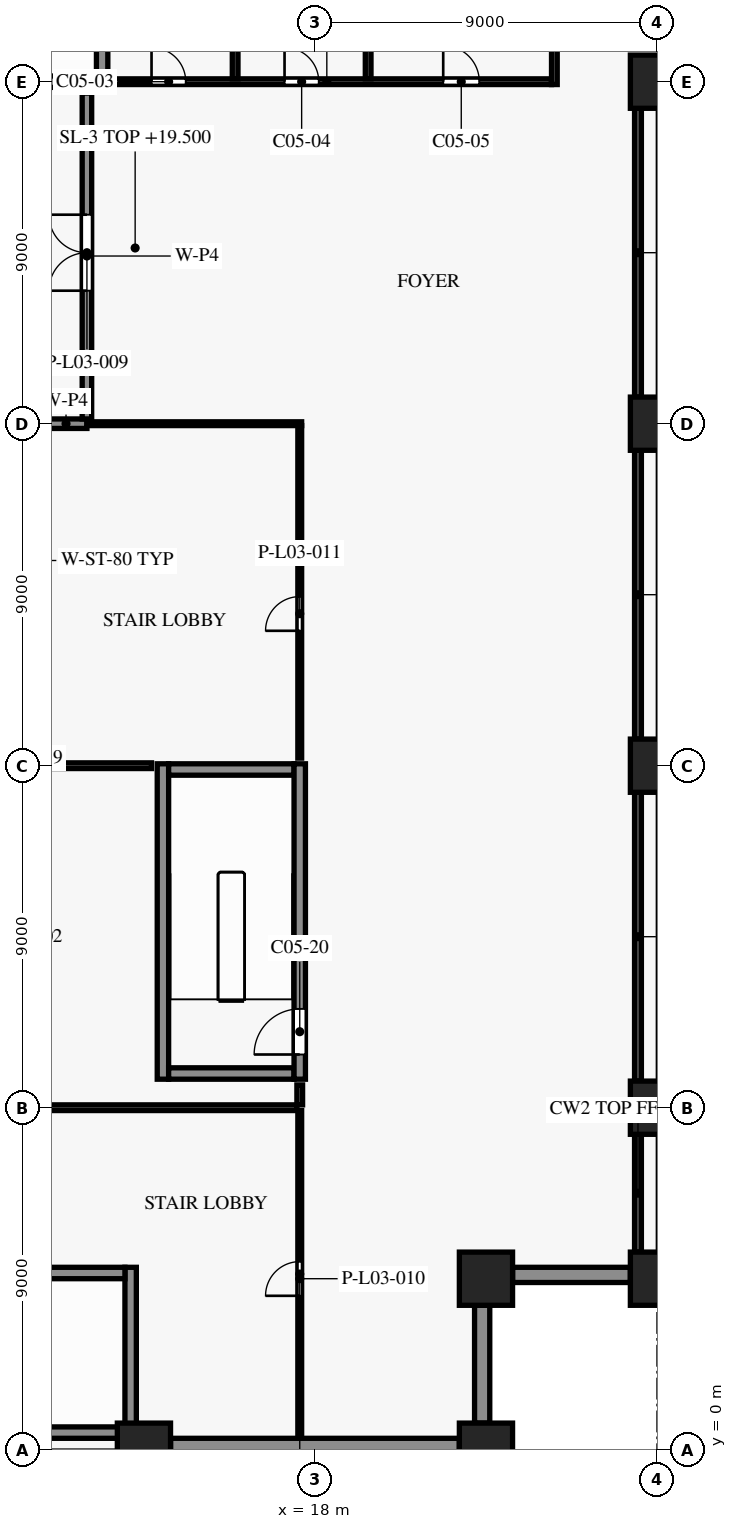
"""IFC4 building model, lengths in metres.
Left out: names, types, materials, properties, quantities, classifications, styles, units other than length and angle.
Written with IfcOpenShell. Run it as: python <this file> out.ifc"""

import sys

from ifc_helpers import new_model, si_unit, direction, frame, frame_2d, origin, origin_2d, place, context, subcontext, project, spatial, rectangle, extrude, element, fill, save


model = new_model("IFC4")
c1 = context("Model", 3, precision=1e-05, world=origin(), true_north=direction((0.0, 1.0)))
c2 = subcontext(c1, "Body", "Model", "MODEL_VIEW")
j1 = project(units=[si_unit("LENGTHUNIT", "METRE"), si_unit("PLANEANGLEUNIT", "RADIAN")], contexts=[c1])
p1 = place(None, origin())
s1 = spatial("IfcSite", under=j1, at=p1, CompositionType="ELEMENT")
p2 = place(p1, origin())
s2 = spatial("IfcBuilding", under=s1, at=p2, CompositionType="ELEMENT")
p3 = place(p2, frame((0.0, 0.0, 19.5)))
s3 = spatial("IfcBuildingStorey", under=s2, at=p3, CompositionType="ELEMENT", Elevation=19.5)
for number, where, z_axis, x_axis in (
    (1, (13.5, 0.0, 0.0), (0.0, 0.0, 1.0), (1.0, 0.0, 0.0)),
    (2, (22.5, 0.0, 0.0), (0.0, 0.0, 1.0), (1.0, 0.0, 0.0)),
    (3, (27.0, 4.5, 0.0), (0.0, 0.0, 1.0), (1.0, 0.0, 0.0)),
    (4, (27.0, 9.0, 0.0), (0.0, 0.0, 1.0), (1.0, 0.0, 0.0)),
    (5, (27.0, 18.0, 0.0), (0.0, 0.0, 1.0), (1.0, 0.0, 0.0)),
    (6, (27.0, 27.0, 0.0), (0.0, 0.0, 1.0), (1.0, 0.0, 0.0)),
    (7, (27.0, 36.0, 0.0), (0.0, 0.0, 1.0), (1.0, 0.0, 0.0)),
    (8, (22.5, 4.5, 0.0), (0.0, 0.0, 1.0), (1.0, 0.0, 0.0)),
):
    element("IfcColumn", number, at=place(p3, frame(where, z_axis=z_axis, x_axis=x_axis)), inside=s3, PredefinedType="COLUMN", context=c2, shape_type="SweptSolid", body=[
        extrude(rectangle(XDim=1.4, YDim=1.4, at=origin_2d()), origin(), (0.0, 0.0, 1.0), 8.0),
    ])
p4 = place(p3, frame((21.8, 0.1, 0.0), z_axis=(0.0, 0.0, 1.0), x_axis=(-1.0, 0.0, 0.0)))
e9 = element("IfcWall", 9, at=p4, inside=s3, PredefinedType="SOLIDWALL", context=c2, shape_type="SweptSolid", body=[
    extrude(rectangle(XDim=7.6, YDim=0.4, at=frame_2d((3.8, 0.0))), origin(), (0.0, 0.0, 1.0), 7.1),
])
for number, where, z_axis, x_axis in (
    (10, (22.4, 3.8, 0.0), (0.0, 0.0, 1.0), (0.0, -1.0, 0.0)),
    (11, (26.3, 4.6, 0.0), (0.0, 0.0, 1.0), (-1.0, 0.0, 0.0)),
):
    element("IfcWall", number, at=place(p3, frame(where, z_axis=z_axis, x_axis=x_axis)), inside=s3, PredefinedType="SOLIDWALL", context=c2, shape_type="SweptSolid", body=[
        extrude(rectangle(XDim=3.1, YDim=0.4, at=frame_2d((1.55, 0.0))), origin(), (0.0, 0.0, 1.0), 7.1),
    ])
p5 = place(p3, frame((5.0, 0.45, 0.0), z_axis=(0.0, 0.0, 1.0), x_axis=(1.0, 0.0, 0.0)))
e12 = element("IfcWall", 12, at=p5, inside=s3, PredefinedType="SHEAR", context=c2, shape_type="SweptSolid", body=[
    extrude(rectangle(XDim=8.0, YDim=0.3, at=frame_2d((4.0, 0.0))), origin(), (0.0, 0.0, 1.0), 7.7),
])
p6 = place(p3, frame((5.0, 4.65, 0.0), z_axis=(0.0, 0.0, 1.0), x_axis=(1.0, 0.0, 0.0)))
e13 = element("IfcWall", 13, at=p6, inside=s3, PredefinedType="SHEAR", context=c2, shape_type="SweptSolid", body=[
    extrude(rectangle(XDim=8.0, YDim=0.3, at=frame_2d((4.0, 0.0))), origin(), (0.0, 0.0, 1.0), 7.7),
])
p7 = place(p6, frame((0.5, 0.0, 0.0)))
e14 = element("IfcOpeningElement", 14, at=p7, cuts=e13, PredefinedType="OPENING", context=c2, shape_type="SweptSolid", body=[
    extrude(rectangle(XDim=1.2, YDim=2.2, at=frame_2d((0.6, 1.1))), frame((0.0, 0.16, 0.0), z_axis=(0.0, -1.0, 0.0), x_axis=(1.0, 0.0, 0.0)), (0.0, 0.0, 1.0), 0.32),
])
for number, where, z_axis, x_axis in (
    (15, (14.15, 9.9, 0.0), (0.0, 0.0, 1.0), (1.0, 0.0, 0.0)),
    (16, (14.15, 17.9, 0.0), (0.0, 0.0, 1.0), (1.0, 0.0, 0.0)),
):
    element("IfcWall", number, at=place(p3, frame(where, z_axis=z_axis, x_axis=x_axis)), inside=s3, PredefinedType="SHEAR", context=c2, shape_type="SweptSolid", body=[
        extrude(rectangle(XDim=3.3, YDim=0.3, at=frame_2d((1.65, 0.0))), origin(), (0.0, 0.0, 1.0), 7.7),
    ])
p8 = place(p3, frame((12.4, 36.0, 0.0), z_axis=(0.0, 0.0, 1.0), x_axis=(1.0, 0.0, 0.0)))
e17 = element("IfcWall", 17, at=p8, inside=s3, PredefinedType="SHEAR", context=c2, shape_type="SweptSolid", body=[
    extrude(rectangle(XDim=11.825, YDim=0.15, at=frame_2d((5.913, 0.0))), origin(), (0.0, 0.0, 1.0), 7.7),
])
p9 = place(p8, frame((1.3, 0.0, 0.0)))
e18 = element("IfcOpeningElement", 18, at=p9, cuts=e17, PredefinedType="OPENING", context=c2, shape_type="SweptSolid", body=[
    extrude(rectangle(XDim=0.9, YDim=2.1, at=frame_2d((0.45, 1.05))), frame((0.0, 0.085, 0.0), z_axis=(0.0, -1.0, 0.0), x_axis=(1.0, 0.0, 0.0)), (0.0, 0.0, 1.0), 0.17),
])
p10 = place(p8, frame((4.8, 0.0, 0.0)))
e19 = element("IfcOpeningElement", 19, at=p10, cuts=e17, PredefinedType="OPENING", context=c2, shape_type="SweptSolid", body=[
    extrude(rectangle(XDim=0.9, YDim=2.1, at=frame_2d((0.45, 1.05))), frame((0.0, 0.085, 0.0), z_axis=(0.0, -1.0, 0.0), x_axis=(1.0, 0.0, 0.0)), (0.0, 0.0, 1.0), 0.17),
])
p11 = place(p8, frame((8.975, 0.0, 0.0)))
e20 = element("IfcOpeningElement", 20, at=p11, cuts=e17, PredefinedType="OPENING", context=c2, shape_type="SweptSolid", body=[
    extrude(rectangle(XDim=0.95, YDim=2.1, at=frame_2d((0.475, 1.05))), frame((0.0, 0.085, 0.0), z_axis=(0.0, -1.0, 0.0), x_axis=(1.0, 0.0, 0.0)), (0.0, 0.0, 1.0), 0.17),
])
p12 = place(p3, frame((4.4, 36.0, 0.0), z_axis=(0.0, 0.0, 1.0), x_axis=(1.0, 0.0, 0.0)))
e21 = element("IfcWall", 21, at=p12, inside=s3, PredefinedType="SHEAR", context=c2, shape_type="SweptSolid", body=[
    extrude(rectangle(XDim=8.0, YDim=0.3, at=frame_2d((4.0, 0.0))), origin(), (0.0, 0.0, 1.0), 7.7),
])
p13 = place(p12, frame((0.3, 0.0, 0.0)))
e22 = element("IfcOpeningElement", 22, at=p13, cuts=e21, PredefinedType="OPENING", context=c2, shape_type="SweptSolid", body=[
    extrude(rectangle(XDim=1.5, YDim=2.2, at=frame_2d((0.75, 1.1))), frame((0.0, 0.16, 0.0), z_axis=(0.0, -1.0, 0.0), x_axis=(1.0, 0.0, 0.0)), (0.0, 0.0, 1.0), 0.32),
])
p14 = place(p3, frame((12.4, 36.15, 0.0), z_axis=(0.0, 0.0, 1.0), x_axis=(0.0, 1.0, 0.0)))
e23 = element("IfcWall", 23, at=p14, inside=s3, PredefinedType="SHEAR", context=c2, shape_type="SweptSolid", body=[
    extrude(rectangle(XDim=3.725, YDim=0.3, at=frame_2d((1.863, 0.0))), origin(), (0.0, 0.0, 1.0), 7.7),
])
p15 = place(p3, frame((13.15, 0.3, 0.0), z_axis=(0.0, 0.0, 1.0), x_axis=(0.0, 1.0, 0.0)))
e24 = element("IfcWall", 24, at=p15, inside=s3, PredefinedType="SHEAR", context=c2, shape_type="SweptSolid", body=[
    extrude(rectangle(XDim=4.5, YDim=0.3, at=frame_2d((2.25, 0.0))), origin(), (0.0, 0.0, 1.0), 7.7),
])
p16 = place(p3, frame((14.0, 9.75, 0.0), z_axis=(0.0, 0.0, 1.0), x_axis=(0.0, 1.0, 0.0)))
e25 = element("IfcWall", 25, at=p16, inside=s3, PredefinedType="SHEAR", context=c2, shape_type="SweptSolid", body=[
    extrude(rectangle(XDim=8.3, YDim=0.3, at=frame_2d((4.15, 0.0))), origin(), (0.0, 0.0, 1.0), 7.7),
])
p17 = place(p3, frame((15.9, 36.075, 0.0), z_axis=(0.0, 0.0, 1.0), x_axis=(0.0, 1.0, 0.0)))
e26 = element("IfcWall", 26, at=p17, inside=s3, PredefinedType="PARTITIONING", context=c2, shape_type="SweptSolid", body=[
    extrude(rectangle(XDim=3.8, YDim=0.15, at=frame_2d((1.9, 0.0))), origin(), (0.0, 0.0, 1.0), 7.7),
])
p18 = place(p3, frame((17.6, 9.75, 0.0), z_axis=(0.0, 0.0, 1.0), x_axis=(0.0, 1.0, 0.0)))
e27 = element("IfcWall", 27, at=p18, inside=s3, PredefinedType="SHEAR", context=c2, shape_type="SweptSolid", body=[
    extrude(rectangle(XDim=8.3, YDim=0.3, at=frame_2d((4.15, 0.0))), origin(), (0.0, 0.0, 1.0), 7.7),
])
p19 = place(p18, frame((0.65, 0.0, 0.0)))
e28 = element("IfcOpeningElement", 28, at=p19, cuts=e27, PredefinedType="OPENING", context=c2, shape_type="SweptSolid", body=[
    extrude(rectangle(XDim=1.2, YDim=2.2, at=frame_2d((0.6, 1.1))), frame((0.0, 0.16, 0.0), z_axis=(0.0, -1.0, 0.0), x_axis=(1.0, 0.0, 0.0)), (0.0, 0.0, 1.0), 0.32),
])
p20 = place(p3, frame((19.4, 36.075, 0.0), z_axis=(0.0, 0.0, 1.0), x_axis=(0.0, 1.0, 0.0)))
e29 = element("IfcWall", 29, at=p20, inside=s3, PredefinedType="PARTITIONING", context=c2, shape_type="SweptSolid", body=[
    extrude(rectangle(XDim=3.8, YDim=0.15, at=frame_2d((1.9, 0.0))), origin(), (0.0, 0.0, 1.0), 7.7),
])
p21 = place(p3, frame((24.3, 35.925, 0.0), z_axis=(0.0, 0.0, 1.0), x_axis=(0.0, 1.0, 0.0)))
e30 = element("IfcWall", 30, at=p21, inside=s3, PredefinedType="SHEAR", context=c2, shape_type="SweptSolid", body=[
    extrude(rectangle(XDim=4.075, YDim=0.15, at=frame_2d((2.038, 0.0))), origin(), (0.0, 0.0, 1.0), 7.7),
])
p22 = place(p3, frame((17.6, 0.32, 0.0), z_axis=(0.0, 0.0, 1.0), x_axis=(0.0, 1.0, 0.0)))
e31 = element("IfcWall", 31, at=p22, inside=s3, PredefinedType="PARTITIONING", context=c2, shape_type="SweptSolid", body=[
    extrude(rectangle(XDim=8.605, YDim=0.1, at=frame_2d((4.302, 0.0))), origin(), (0.0, 0.0, 1.0), 6.98),
])
p23 = place(p22, frame((3.73, 0.0, 0.0)))
e32 = element("IfcOpeningElement", 32, at=p23, cuts=e31, PredefinedType="OPENING", context=c2, shape_type="SweptSolid", body=[
    extrude(rectangle(XDim=0.9, YDim=2.1, at=frame_2d((0.45, 1.05))), frame((0.0, 0.06, 0.0), z_axis=(0.0, -1.0, 0.0), x_axis=(1.0, 0.0, 0.0)), (0.0, 0.0, 1.0), 0.12),
])
p24 = place(p3, frame((0.72, 9.0, 0.0), z_axis=(0.0, 0.0, 1.0), x_axis=(1.0, 0.0, 0.0)))
e33 = element("IfcWall", 33, at=p24, inside=s3, PredefinedType="PARTITIONING", context=c2, shape_type="SweptSolid", body=[
    extrude(rectangle(XDim=16.805, YDim=0.15, at=frame_2d((8.402, 0.0))), origin(), (0.0, 0.0, 1.0), 6.98),
])
p25 = place(p3, frame((17.6, 9.075, 0.0), z_axis=(0.0, 0.0, 1.0), x_axis=(0.0, 1.0, 0.0)))
e34 = element("IfcWall", 34, at=p25, inside=s3, PredefinedType="PARTITIONING", context=c2, shape_type="SweptSolid", body=[
    extrude(rectangle(XDim=0.525, YDim=0.15, at=frame_2d((0.263, 0.0))), origin(), (0.0, 0.0, 1.0), 6.98),
])
p26 = place(p3, frame((13.7, 18.0, 0.0), z_axis=(0.0, 0.0, 1.0), x_axis=(-1.0, 0.0, 0.0)))
e35 = element("IfcWall", 35, at=p26, inside=s3, PredefinedType="PARTITIONING", context=c2, shape_type="SweptSolid", body=[
    extrude(rectangle(XDim=13.88, YDim=0.15, at=frame_2d((6.94, 0.0))), origin(), (0.0, 0.0, 1.0), 6.98),
])
p27 = place(p26, frame((10.25, 0.0, 0.0)))
e36 = element("IfcOpeningElement", 36, at=p27, cuts=e35, PredefinedType="OPENING", context=c2, shape_type="SweptSolid", body=[
    extrude(rectangle(XDim=0.9, YDim=2.1, at=frame_2d((0.45, 1.05))), frame((0.0, 0.085, 0.0), z_axis=(0.0, -1.0, 0.0), x_axis=(1.0, 0.0, 0.0)), (0.0, 0.0, 1.0), 0.17),
])
p28 = place(p3, frame((17.6, 18.2, 0.0), z_axis=(0.0, 0.0, 1.0), x_axis=(0.0, 1.0, 0.0)))
e37 = element("IfcWall", 37, at=p28, inside=s3, PredefinedType="PARTITIONING", context=c2, shape_type="SweptSolid", body=[
    extrude(rectangle(XDim=8.75, YDim=0.1, at=frame_2d((4.375, 0.0))), origin(), (0.0, 0.0, 1.0), 6.98),
])
p29 = place(p28, frame((3.35, 0.0, 0.0)))
e38 = element("IfcOpeningElement", 38, at=p29, cuts=e37, PredefinedType="OPENING", context=c2, shape_type="SweptSolid", body=[
    extrude(rectangle(XDim=0.9, YDim=2.1, at=frame_2d((0.45, 1.05))), frame((0.0, 0.06, 0.0), z_axis=(0.0, -1.0, 0.0), x_axis=(1.0, 0.0, 0.0)), (0.0, 0.0, 1.0), 0.12),
])
p30 = place(p3, frame((10.9, 27.0, 0.0), z_axis=(0.0, 0.0, 1.0), x_axis=(1.0, 0.0, 0.0)))
e39 = element("IfcWall", 39, at=p30, inside=s3, PredefinedType="PARTITIONING", context=c2, shape_type="SweptSolid", body=[
    extrude(rectangle(XDim=1.1, YDim=0.25, at=frame_2d((0.55, 0.0))), origin(), (0.0, 0.0, 1.0), 6.98),
])
p31 = place(p3, frame((17.65, 27.0, 0.0), z_axis=(0.0, 0.0, 1.0), x_axis=(-1.0, 0.0, 0.0)))
e40 = element("IfcWall", 40, at=p31, inside=s3, PredefinedType="PARTITIONING", context=c2, shape_type="SweptSolid", body=[
    extrude(rectangle(XDim=5.65, YDim=0.1, at=frame_2d((2.825, 0.0))), origin(), (0.0, 0.0, 1.0), 6.98),
])
p32 = place(p3, frame((12.0, 27.125, 0.0), z_axis=(0.0, 0.0, 1.0), x_axis=(0.0, 1.0, 0.0)))
e41 = element("IfcWall", 41, at=p32, inside=s3, PredefinedType="PARTITIONING", context=c2, shape_type="SweptSolid", body=[
    extrude(rectangle(XDim=8.575, YDim=0.25, at=frame_2d((4.288, 0.0))), origin(), (0.0, 0.0, 1.0), 6.98),
])
p33 = place(p32, frame((3.375, 0.0, 0.0)))
e42 = element("IfcOpeningElement", 42, at=p33, cuts=e41, PredefinedType="OPENING", context=c2, shape_type="SweptSolid", body=[
    extrude(rectangle(XDim=2.0, YDim=2.1, at=frame_2d((1.0, 1.05))), frame((0.0, 0.135, 0.0), z_axis=(0.0, -1.0, 0.0), x_axis=(1.0, 0.0, 0.0)), (0.0, 0.0, 1.0), 0.27),
])
p34 = place(p9, origin())
e43 = element("IfcDoor", 43, at=p34, inside=s3, OperationType="SINGLE_SWING_RIGHT", PredefinedType="DOOR", context=c2, shape_type="SweptSolid", body=[
    extrude(rectangle(XDim=0.9, YDim=2.1, at=frame_2d((0.45, 1.05))), frame((0.0, 0.025, 0.0), z_axis=(0.0, -1.0, 0.0), x_axis=(1.0, 0.0, 0.0)), (0.0, 0.0, 1.0), 0.05),
])
fill(e18, e43)
p35 = place(p10, origin())
e44 = element("IfcDoor", 44, at=p35, inside=s3, OperationType="SINGLE_SWING_LEFT", PredefinedType="DOOR", context=c2, shape_type="SweptSolid", body=[
    extrude(rectangle(XDim=0.9, YDim=2.1, at=frame_2d((0.45, 1.05))), frame((0.0, 0.025, 0.0), z_axis=(0.0, -1.0, 0.0), x_axis=(1.0, 0.0, 0.0)), (0.0, 0.0, 1.0), 0.05),
])
fill(e19, e44)
p36 = place(p11, origin())
e45 = element("IfcDoor", 45, at=p36, inside=s3, OperationType="SINGLE_SWING_RIGHT", PredefinedType="DOOR", context=c2, shape_type="SweptSolid", body=[
    extrude(rectangle(XDim=0.95, YDim=2.1, at=frame_2d((0.475, 1.05))), frame((0.0, 0.025, 0.0), z_axis=(0.0, -1.0, 0.0), x_axis=(1.0, 0.0, 0.0)), (0.0, 0.0, 1.0), 0.05),
])
fill(e20, e45)
p37 = place(p19, origin())
e46 = element("IfcDoor", 46, at=p37, inside=s3, OperationType="SINGLE_SWING_LEFT", PredefinedType="DOOR", context=c2, shape_type="SweptSolid", body=[
    extrude(rectangle(XDim=1.2, YDim=2.2, at=frame_2d((0.6, 1.1))), frame((0.0, 0.025, 0.0), z_axis=(0.0, -1.0, 0.0), x_axis=(1.0, 0.0, 0.0)), (0.0, 0.0, 1.0), 0.05),
])
fill(e28, e46)
p38 = place(p33, origin())
e47 = element("IfcDoor", 47, at=p38, inside=s3, OperationType="DOUBLE_DOOR_SINGLE_SWING", PredefinedType="DOOR", context=c2, shape_type="SweptSolid", body=[
    extrude(rectangle(XDim=2.0, YDim=2.1, at=frame_2d((1.0, 1.05))), frame((0.0, 0.025, 0.0), z_axis=(0.0, -1.0, 0.0), x_axis=(1.0, 0.0, 0.0)), (0.0, 0.0, 1.0), 0.05),
])
fill(e42, e47)
p39 = place(p23, origin())
e48 = element("IfcDoor", 48, at=p39, inside=s3, OperationType="SINGLE_SWING_LEFT", PredefinedType="DOOR", context=c2, shape_type="SweptSolid", body=[
    extrude(rectangle(XDim=0.9, YDim=2.1, at=frame_2d((0.45, 1.05))), frame((0.0, 0.025, 0.0), z_axis=(0.0, -1.0, 0.0), x_axis=(1.0, 0.0, 0.0)), (0.0, 0.0, 1.0), 0.05),
])
fill(e32, e48)
p40 = place(p29, origin())
e49 = element("IfcDoor", 49, at=p40, inside=s3, OperationType="SINGLE_SWING_LEFT", PredefinedType="DOOR", context=c2, shape_type="SweptSolid", body=[
    extrude(rectangle(XDim=0.9, YDim=2.1, at=frame_2d((0.45, 1.05))), frame((0.0, 0.025, 0.0), z_axis=(0.0, -1.0, 0.0), x_axis=(1.0, 0.0, 0.0)), (0.0, 0.0, 1.0), 0.05),
])
fill(e38, e49)
save(model, sys.argv[1])
